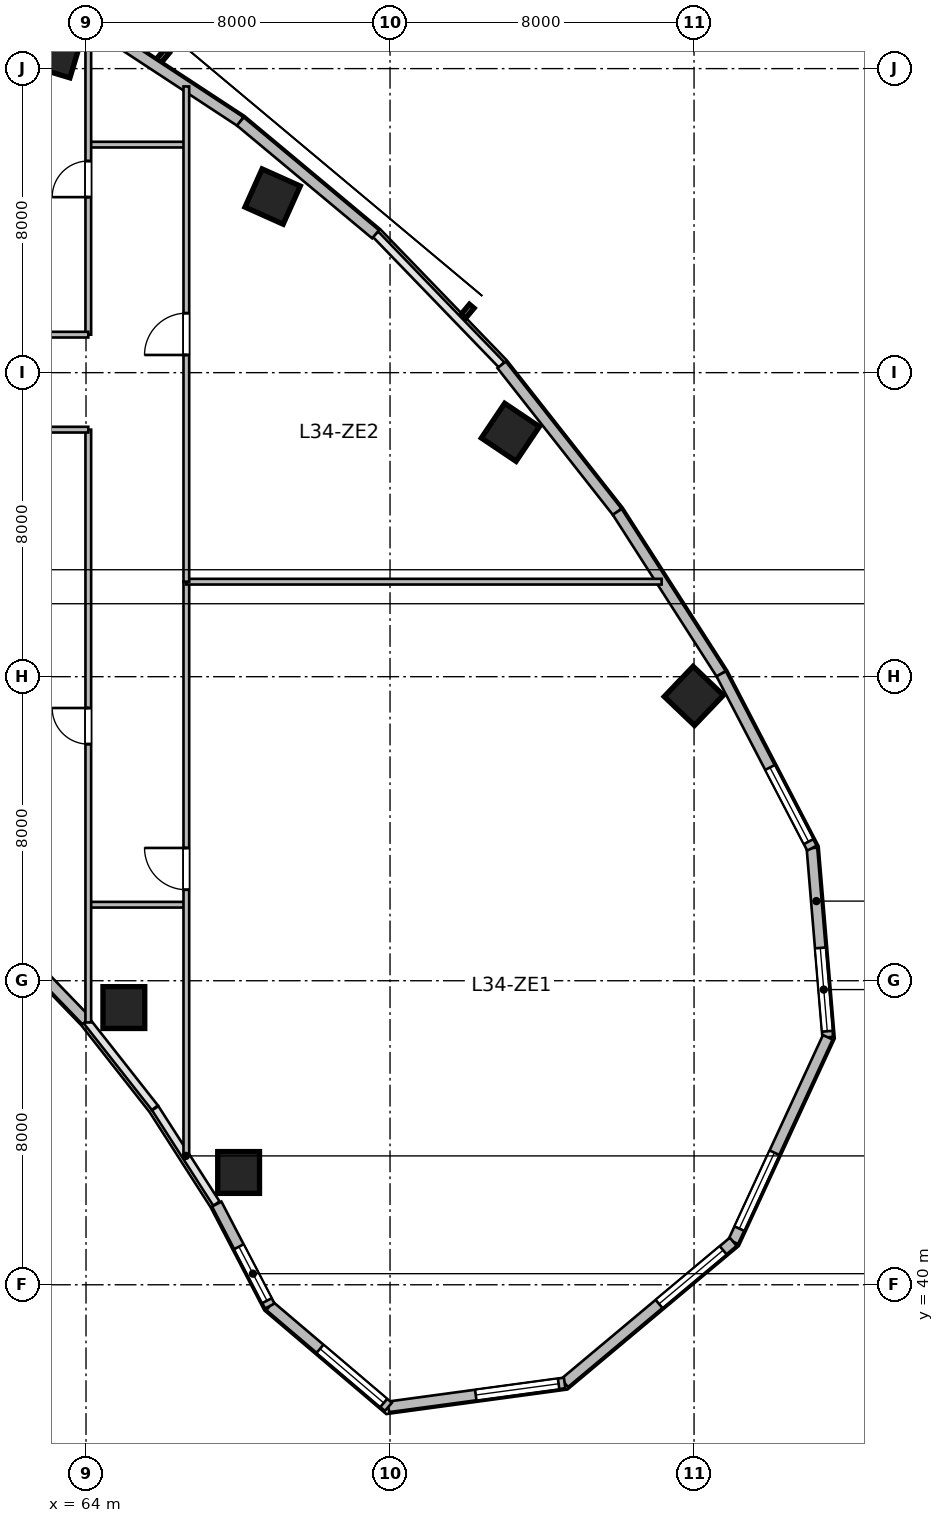
"""IFC4 building model, lengths in metres.
Left out: names, types, materials, properties, quantities, classifications, styles, units other than length and angle.
Written with IfcOpenShell. Run it as: python <this file> out.ifc"""

import sys

from ifc_helpers import new_model, si_unit, direction, frame, frame_2d, origin, origin_2d, place, context, subcontext, project, spatial, rectangle, circle, extrude, source, transform, mapped, element, fill, save


model = new_model("IFC4")
c1 = context("Model", 3, precision=1e-05, world=origin(), true_north=direction((0.0, 1.0)))
c2 = subcontext(c1, "Body", "Model", "MODEL_VIEW")
j1 = project(units=[si_unit("LENGTHUNIT", "METRE"), si_unit("PLANEANGLEUNIT", "RADIAN")], contexts=[c1])
p1 = place(None, origin())
s1 = spatial("IfcSite", under=j1, at=p1, CompositionType="ELEMENT")
p2 = place(p1, origin())
s2 = spatial("IfcBuilding", under=s1, at=p2, CompositionType="ELEMENT")
p3 = place(p2, frame((0.0, 0.0, 142.8)))
s3 = spatial("IfcBuildingStorey", under=s2, at=p3, CompositionType="ELEMENT", Elevation=142.8)
m1 = source(origin(), c2, "Body", "SweptSolid", [
    extrude(rectangle(XDim=1.1, YDim=1.1, at=origin_2d()), origin(), (0.0, 0.0, 1.0), 3.9),
])
for number, where, z_axis, x_axis in (
    (1, (63.209, 72.442, 0.0), (0.0, 0.0, 1.0), (0.289, 0.957, 0.0)),
    (2, (68.91, 68.633, 0.0), (0.0, 0.0, 1.0), (0.409, 0.912, 0.0)),
):
    element("IfcColumn", number, at=place(p3, frame(where, z_axis=z_axis, x_axis=x_axis)), inside=s3, PredefinedType="COLUMN", context=c2, shape_type="MappedRepresentation", body=[
        mapped(m1, transform((0.0, 0.0, 0.0), scale=1.0)),
    ])
m2 = source(origin(), c2, "Body", "SweptSolid", [
    extrude(circle(Radius=0.55, at=origin_2d()), origin(), (0.0, 0.0, 1.0), 3.9),
])
p4 = place(p3, frame((64.996, 47.294, 0.0), z_axis=(0.0, 0.0, 1.0), x_axis=(0.55774510898, 0.830012285095, 0.0)))
e3 = element("IfcColumn", 3, at=p4, inside=s3, PredefinedType="COLUMN", context=c2, shape_type="MappedRepresentation", body=[
    mapped(m2, transform((0.0, 0.0, 0.0), scale=1.0)),
])
p5 = place(p3, frame((75.167, 62.43, 0.0), z_axis=(0.0, 0.0, 1.0), x_axis=(0.55774510898, 0.830012285095, 0.0)))
e4 = element("IfcColumn", 4, at=p5, inside=s3, PredefinedType="COLUMN", context=c2, shape_type="MappedRepresentation", body=[
    mapped(m1, transform((0.0, 0.0, 0.0), scale=1.0)),
])
p6 = place(p3, frame((68.015, 42.955, 0.0), z_axis=(0.0, 0.0, 1.0), x_axis=(0.690756218984, 0.723087716626, 0.0)))
e5 = element("IfcColumn", 5, at=p6, inside=s3, PredefinedType="COLUMN", context=c2, shape_type="MappedRepresentation", body=[
    mapped(m2, transform((0.0, 0.0, 0.0), scale=1.0)),
])
p7 = place(p3, frame((79.993, 55.494, 0.0), z_axis=(0.0, 0.0, 1.0), x_axis=(0.690756218984, 0.723087716626, 0.0)))
e6 = element("IfcColumn", 6, at=p7, inside=s3, PredefinedType="COLUMN", context=c2, shape_type="MappedRepresentation", body=[
    mapped(m1, transform((0.0, 0.0, 0.0), scale=1.0)),
])
m3 = source(origin(), c2, "Body", "SweptSolid", [
    extrude(rectangle(XDim=4.994, YDim=0.28, at=frame_2d((2.497, 0.0))), origin(), (0.0, 0.0, 1.0), 3.65),
])
p8 = place(p3, frame((83.102, 51.489, 0.0), z_axis=(0.0, 0.0, 1.0), x_axis=(0.083344839916, -0.996520766296, 0.0)))
e7 = element("IfcWall", 7, at=p8, inside=s3, PredefinedType="SOLIDWALL", context=c2, shape_type="MappedRepresentation", body=[
    mapped(m3, transform((0.0, 0.0, 0.0), scale=1.0)),
])
p9 = place(p8, frame((2.635, 0.0, 0.95)))
e8 = element("IfcOpeningElement", 8, at=p9, cuts=e7, PredefinedType="OPENING", context=c2, shape_type="SweptSolid", body=[
    extrude(rectangle(XDim=2.2, YDim=2.1, at=frame_2d((1.1, 1.05))), frame((0.0, 0.15, 0.0), z_axis=(0.0, -1.0, 0.0), x_axis=(1.0, 0.0, 0.0)), (0.0, 0.0, 1.0), 0.3),
])
m4 = source(origin(), c2, "Body", "SweptSolid", [
    extrude(rectangle(XDim=5.927, YDim=0.28, at=frame_2d((2.964, 0.0))), origin(), (0.0, 0.0, 1.0), 3.65),
])
p10 = place(p3, frame((83.519, 46.512, 0.0), z_axis=(0.0, 0.0, 1.0), x_axis=(-0.419656204795, -0.907683132914, 0.0)))
e9 = element("IfcWall", 9, at=p10, inside=s3, PredefinedType="SOLIDWALL", context=c2, shape_type="MappedRepresentation", body=[
    mapped(m4, transform((0.0, 0.0, 0.0), scale=1.0)),
])
p11 = place(p10, frame((3.346, 0.0, 0.95)))
e10 = element("IfcOpeningElement", 10, at=p11, cuts=e9, PredefinedType="OPENING", context=c2, shape_type="SweptSolid", body=[
    extrude(rectangle(XDim=2.2, YDim=2.1, at=frame_2d((1.1, 1.05))), frame((0.0, 0.15, 0.0), z_axis=(0.0, -1.0, 0.0), x_axis=(1.0, 0.0, 0.0)), (0.0, 0.0, 1.0), 0.3),
])
m5 = source(origin(), c2, "Body", "SweptSolid", [
    extrude(rectangle(XDim=5.786, YDim=0.28, at=frame_2d((2.893, 0.0))), origin(), (0.0, 0.0, 1.0), 3.65),
])
p12 = place(p3, frame((81.031, 41.131, 0.0), z_axis=(0.0, 0.0, 1.0), x_axis=(-0.766711306852, -0.641992034176, 0.0)))
e11 = element("IfcWall", 11, at=p12, inside=s3, PredefinedType="SOLIDWALL", context=c2, shape_type="MappedRepresentation", body=[
    mapped(m5, transform((0.0, 0.0, 0.0), scale=1.0)),
])
p13 = place(p12, frame((0.347, 0.0, 0.95)))
e12 = element("IfcOpeningElement", 12, at=p13, cuts=e11, PredefinedType="OPENING", context=c2, shape_type="SweptSolid", body=[
    extrude(rectangle(XDim=2.2, YDim=2.1, at=frame_2d((1.1, 1.05))), frame((0.0, 0.15, 0.0), z_axis=(0.0, -1.0, 0.0), x_axis=(1.0, 0.0, 0.0)), (0.0, 0.0, 1.0), 0.3),
])
m6 = source(origin(), c2, "Body", "SweptSolid", [
    extrude(rectangle(XDim=4.68, YDim=0.28, at=frame_2d((2.34, 0.0))), origin(), (0.0, 0.0, 1.0), 3.65),
])
p14 = place(p3, frame((76.594, 37.417, 0.0), z_axis=(0.0, 0.0, 1.0), x_axis=(-0.990931146435, -0.134370618162, 0.0)))
e13 = element("IfcWall", 13, at=p14, inside=s3, PredefinedType="SOLIDWALL", context=c2, shape_type="MappedRepresentation", body=[
    mapped(m6, transform((0.0, 0.0, 0.0), scale=1.0)),
])
p15 = place(p14, frame((0.16, 0.0, 0.95)))
e14 = element("IfcOpeningElement", 14, at=p15, cuts=e13, PredefinedType="OPENING", context=c2, shape_type="SweptSolid", body=[
    extrude(rectangle(XDim=2.2, YDim=2.1, at=frame_2d((1.1, 1.05))), frame((0.0, 0.15, 0.0), z_axis=(0.0, -1.0, 0.0), x_axis=(1.0, 0.0, 0.0)), (0.0, 0.0, 1.0), 0.3),
])
m7 = source(origin(), c2, "Body", "SweptSolid", [
    extrude(rectangle(XDim=4.096, YDim=0.28, at=frame_2d((2.048, 0.0))), origin(), (0.0, 0.0, 1.0), 3.65),
])
p16 = place(p3, frame((71.957, 36.788, 0.0), z_axis=(0.0, 0.0, 1.0), x_axis=(-0.761926081737, 0.647663991564, 0.0)))
e15 = element("IfcWall", 15, at=p16, inside=s3, PredefinedType="SOLIDWALL", context=c2, shape_type="MappedRepresentation", body=[
    mapped(m7, transform((0.0, 0.0, 0.0), scale=1.0)),
])
p17 = place(p16, frame((0.16, 0.0, 0.95)))
e16 = element("IfcOpeningElement", 16, at=p17, cuts=e15, PredefinedType="OPENING", context=c2, shape_type="SweptSolid", body=[
    extrude(rectangle(XDim=2.2, YDim=2.1, at=frame_2d((1.1, 1.05))), frame((0.0, 0.15, 0.0), z_axis=(0.0, -1.0, 0.0), x_axis=(1.0, 0.0, 0.0)), (0.0, 0.0, 1.0), 0.3),
])
m8 = source(origin(), c2, "Body", "SweptSolid", [
    extrude(rectangle(XDim=3.024, YDim=0.28, at=frame_2d((1.512, 0.0))), origin(), (0.0, 0.0, 1.0), 3.65),
])
p18 = place(p3, frame((68.836, 39.44, 0.0), z_axis=(0.0, 0.0, 1.0), x_axis=(-0.461718746531, 0.887026380161, 0.0)))
e17 = element("IfcWall", 17, at=p18, inside=s3, PredefinedType="SOLIDWALL", context=c2, shape_type="MappedRepresentation", body=[
    mapped(m8, transform((0.0, 0.0, 0.0), scale=1.0)),
])
p19 = place(p18, frame((0.16, 0.0, 0.95)))
e18 = element("IfcOpeningElement", 18, at=p19, cuts=e17, PredefinedType="OPENING", context=c2, shape_type="SweptSolid", body=[
    extrude(rectangle(XDim=1.6, YDim=1.9, at=frame_2d((0.8, 0.95))), frame((0.0, 0.15, 0.0), z_axis=(0.0, -1.0, 0.0), x_axis=(1.0, 0.0, 0.0)), (0.0, 0.0, 1.0), 0.3),
])
m9 = source(origin(), c2, "Body", "SweptSolid", [
    extrude(rectangle(XDim=2.812, YDim=0.28, at=frame_2d((1.406, 0.0))), origin(), (0.0, 0.0, 1.0), 3.65),
])
p20 = place(p3, frame((64.008, 46.95, 0.0), z_axis=(0.0, 0.0, 1.0), x_axis=(-0.694583668785, 0.719411931411, 0.0)))
e19 = element("IfcWall", 19, at=p20, inside=s3, PredefinedType="SOLIDWALL", context=c2, shape_type="MappedRepresentation", body=[
    mapped(m9, transform((0.0, 0.0, 0.0), scale=1.0)),
])
m10 = source(origin(), c2, "Body", "SweptSolid", [
    extrude(rectangle(XDim=4.501, YDim=0.28, at=frame_2d((2.25, 0.0))), origin(), (0.0, 0.0, 1.0), 3.65),
])
p21 = place(p3, frame((64.298, 73.08, 0.0), z_axis=(0.0, 0.0, 1.0), x_axis=(0.835984920737, -0.548752414391, 0.0)))
e20 = element("IfcWall", 20, at=p21, inside=s3, PredefinedType="SOLIDWALL", context=c2, shape_type="MappedRepresentation", body=[
    mapped(m10, transform((0.0, 0.0, 0.0), scale=1.0)),
])
m11 = source(origin(), c2, "Body", "SweptSolid", [
    extrude(rectangle(XDim=4.634, YDim=0.28, at=frame_2d((2.317, 0.0))), origin(), (0.0, 0.0, 1.0), 3.65),
])
p22 = place(p3, frame((68.061, 70.61, 0.0), z_axis=(0.0, 0.0, 1.0), x_axis=(0.767910229096, -0.640557475993, 0.0)))
e21 = element("IfcWall", 21, at=p22, inside=s3, PredefinedType="SOLIDWALL", context=c2, shape_type="MappedRepresentation", body=[
    mapped(m11, transform((0.0, 0.0, 0.0), scale=1.0)),
])
m12 = source(origin(), c2, "Body", "SweptSolid", [
    extrude(rectangle(XDim=4.922, YDim=0.28, at=frame_2d((2.461, 0.0))), origin(), (0.0, 0.0, 1.0), 3.65),
])
p23 = place(p3, frame((74.936, 64.206, 0.0), z_axis=(0.0, 0.0, 1.0), x_axis=(0.61817639101, -0.786039407153, 0.0)))
e22 = element("IfcWall", 22, at=p23, inside=s3, PredefinedType="SOLIDWALL", context=c2, shape_type="MappedRepresentation", body=[
    mapped(m12, transform((0.0, 0.0, 0.0), scale=1.0)),
])
m13 = source(origin(), c2, "Body", "SweptSolid", [
    extrude(rectangle(XDim=5.065, YDim=0.28, at=frame_2d((2.532, 0.0))), origin(), (0.0, 0.0, 1.0), 3.65),
])
p24 = place(p3, frame((77.979, 60.338, 0.0), z_axis=(0.0, 0.0, 1.0), x_axis=(0.540177618806, -0.841551032404, 0.0)))
e23 = element("IfcWall", 23, at=p24, inside=s3, PredefinedType="SOLIDWALL", context=c2, shape_type="MappedRepresentation", body=[
    mapped(m13, transform((0.0, 0.0, 0.0), scale=1.0)),
])
m14 = source(origin(), c2, "Body", "SweptSolid", [
    extrude(rectangle(XDim=5.171, YDim=0.28, at=frame_2d((2.585, 0.0))), origin(), (0.0, 0.0, 1.0), 3.65),
])
p25 = place(p3, frame((80.715, 56.075, 0.0), z_axis=(0.0, 0.0, 1.0), x_axis=(0.461752581363, -0.887008767491, 0.0)))
e24 = element("IfcWall", 24, at=p25, inside=s3, PredefinedType="SOLIDWALL", context=c2, shape_type="MappedRepresentation", body=[
    mapped(m14, transform((0.0, 0.0, 0.0), scale=1.0)),
])
p26 = place(p25, frame((2.778, 0.0, 0.95)))
e25 = element("IfcOpeningElement", 25, at=p26, cuts=e24, PredefinedType="OPENING", context=c2, shape_type="SweptSolid", body=[
    extrude(rectangle(XDim=2.2, YDim=2.1, at=frame_2d((1.1, 1.05))), frame((0.0, 0.15, 0.0), z_axis=(0.0, -1.0, 0.0), x_axis=(1.0, 0.0, 0.0)), (0.0, 0.0, 1.0), 0.3),
])
m15 = source(origin(), c2, "Body", "SweptSolid", [
    extrude(rectangle(XDim=2.5, YDim=0.15, at=frame_2d((1.25, 0.0))), origin(), (0.0, 0.0, 1.0), 3.65),
])
for number, where, z_axis, x_axis in (
    (26, (64.1, 50.0, 0.0), (0.0, 0.0, 1.0), (1.0, 0.0, 0.0)),
    (27, (64.1, 70.0, 0.0), (0.0, 0.0, 1.0), (1.0, 0.0, 0.0)),
):
    element("IfcWall", number, at=place(p3, frame(where, z_axis=z_axis, x_axis=x_axis)), inside=s3, PredefinedType="PARTITIONING", context=c2, shape_type="MappedRepresentation", body=[
        mapped(m15, transform((0.0, 0.0, 0.0), scale=1.0)),
    ])
m16 = source(origin(), c2, "Body", "SweptSolid", [
    extrude(rectangle(XDim=15.112, YDim=0.15, at=frame_2d((7.556, 0.0))), origin(), (0.0, 0.0, 1.0), 2.942),
])
p27 = place(p3, frame((66.64, 43.388, 0.0), z_axis=(0.0, 0.0, 1.0), x_axis=(0.0, 1.0, 0.0)))
e28 = element("IfcWall", 28, at=p27, inside=s3, PredefinedType="PARTITIONING", context=c2, shape_type="MappedRepresentation", body=[
    mapped(m16, transform((0.0, 0.0, 0.0), scale=1.0)),
])
p28 = place(p27, frame((7.006, 0.0, 0.0)))
e29 = element("IfcOpeningElement", 29, at=p28, cuts=e28, PredefinedType="OPENING", context=c2, shape_type="SweptSolid", body=[
    extrude(rectangle(XDim=1.1, YDim=2.15, at=frame_2d((0.55, 1.075))), frame((0.0, 0.085, 0.0), z_axis=(0.0, -1.0, 0.0), x_axis=(1.0, 0.0, 0.0)), (0.0, 0.0, 1.0), 0.17),
])
m17 = source(origin(), c2, "Body", "SweptSolid", [
    extrude(rectangle(XDim=12.507, YDim=0.15, at=frame_2d((6.253, 0.0))), origin(), (0.0, 0.0, 1.0), 3.65),
])
p29 = place(p3, frame((66.64, 58.5, 0.0), z_axis=(0.0, 0.0, 1.0), x_axis=(1.0, 0.0, 0.0)))
e30 = element("IfcWall", 30, at=p29, inside=s3, PredefinedType="PARTITIONING", context=c2, shape_type="MappedRepresentation", body=[
    mapped(m17, transform((0.0, 0.0, 0.0), scale=1.0)),
])
m18 = source(origin(), c2, "Body", "SweptSolid", [
    extrude(rectangle(XDim=13.031, YDim=0.15, at=frame_2d((6.515, 0.0))), origin(), (0.0, 0.0, 1.0), 2.942),
])
p30 = place(p3, frame((66.64, 58.5, 0.0), z_axis=(0.0, 0.0, 1.0), x_axis=(0.0, 1.0, 0.0)))
e31 = element("IfcWall", 31, at=p30, inside=s3, PredefinedType="PARTITIONING", context=c2, shape_type="MappedRepresentation", body=[
    mapped(m18, transform((0.0, 0.0, 0.0), scale=1.0)),
])
p31 = place(p30, frame((5.965, 0.0, 0.0)))
e32 = element("IfcOpeningElement", 32, at=p31, cuts=e31, PredefinedType="OPENING", context=c2, shape_type="SweptSolid", body=[
    extrude(rectangle(XDim=1.1, YDim=2.15, at=frame_2d((0.55, 1.075))), frame((0.0, 0.085, 0.0), z_axis=(0.0, -1.0, 0.0), x_axis=(1.0, 0.0, 0.0)), (0.0, 0.0, 1.0), 0.17),
])
m19 = source(origin(), c2, "Body", "SweptSolid", [
    extrude(rectangle(XDim=15.598, YDim=0.15, at=frame_2d((7.799, 0.0))), origin(), (0.0, 0.0, 1.0), 2.942),
])
p32 = place(p3, frame((64.06, 46.902, 0.0), z_axis=(0.0, 0.0, 1.0), x_axis=(0.0, 1.0, 0.0)))
e33 = element("IfcWall", 33, at=p32, inside=s3, PredefinedType="PARTITIONING", context=c2, shape_type="MappedRepresentation", body=[
    mapped(m19, transform((0.0, 0.0, 0.0), scale=1.0)),
])
p33 = place(p32, frame((7.324, 0.0, 0.0)))
e34 = element("IfcOpeningElement", 34, at=p33, cuts=e33, PredefinedType="OPENING", context=c2, shape_type="SweptSolid", body=[
    extrude(rectangle(XDim=0.95, YDim=2.1, at=frame_2d((0.475, 1.05))), frame((0.0, 0.085, 0.0), z_axis=(0.0, -1.0, 0.0), x_axis=(1.0, 0.0, 0.0)), (0.0, 0.0, 1.0), 0.17),
])
m20 = source(origin(), c2, "Body", "SweptSolid", [
    extrude(rectangle(XDim=4.56, YDim=0.15, at=frame_2d((2.28, 0.0))), origin(), (0.0, 0.0, 1.0), 3.65),
])
p34 = place(p3, frame((59.5, 62.5, 0.0), z_axis=(0.0, 0.0, 1.0), x_axis=(1.0, 0.0, 0.0)))
e35 = element("IfcWall", 35, at=p34, inside=s3, PredefinedType="PARTITIONING", context=c2, shape_type="MappedRepresentation", body=[
    mapped(m20, transform((0.0, 0.0, 0.0), scale=1.0)),
])
m21 = source(origin(), c2, "Body", "SweptSolid", [
    extrude(rectangle(XDim=8.187, YDim=0.15, at=frame_2d((4.093, 0.0))), origin(), (0.0, 0.0, 1.0), 3.65),
])
p35 = place(p3, frame((64.06, 65.0, 0.0), z_axis=(0.0, 0.0, 1.0), x_axis=(0.0, 1.0, 0.0)))
e36 = element("IfcWall", 36, at=p35, inside=s3, PredefinedType="PARTITIONING", context=c2, shape_type="MappedRepresentation", body=[
    mapped(m21, transform((0.0, 0.0, 0.0), scale=1.0)),
])
p36 = place(p35, frame((3.618, 0.0, 0.0)))
e37 = element("IfcOpeningElement", 37, at=p36, cuts=e36, PredefinedType="OPENING", context=c2, shape_type="SweptSolid", body=[
    extrude(rectangle(XDim=0.95, YDim=2.1, at=frame_2d((0.475, 1.05))), frame((0.0, 0.085, 0.0), z_axis=(0.0, -1.0, 0.0), x_axis=(1.0, 0.0, 0.0)), (0.0, 0.0, 1.0), 0.17),
])
m22 = source(origin(), c2, "Body", "SweptSolid", [
    extrude(rectangle(XDim=2.46, YDim=0.15, at=frame_2d((1.23, 0.0))), origin(), (0.0, 0.0, 1.0), 3.65),
])
p37 = place(p3, frame((61.6, 65.0, 0.0), z_axis=(0.0, 0.0, 1.0), x_axis=(1.0, 0.0, 0.0)))
e38 = element("IfcWall", 38, at=p37, inside=s3, PredefinedType="PARTITIONING", context=c2, shape_type="MappedRepresentation", body=[
    mapped(m22, transform((0.0, 0.0, 0.0), scale=1.0)),
])
m23 = source(origin(), c2, "Body", "SweptSolid", [
    extrude(rectangle(XDim=2.2, YDim=2.1, at=frame_2d((1.1, 1.05))), frame((0.0, 0.03, 0.0), z_axis=(0.0, -1.0, 0.0), x_axis=(1.0, 0.0, 0.0)), (0.0, 0.0, 1.0), 0.06),
])
p38 = place(p9, origin())
e39 = element("IfcWindow", 39, at=p38, inside=s3, PartitioningType="TRIPLE_PANEL_VERTICAL", PredefinedType="WINDOW", context=c2, shape_type="MappedRepresentation", body=[
    mapped(m23, transform((0.0, 0.0, 0.0), scale=1.0)),
])
fill(e8, e39)
p39 = place(p11, origin())
e40 = element("IfcWindow", 40, at=p39, inside=s3, PartitioningType="TRIPLE_PANEL_VERTICAL", PredefinedType="WINDOW", context=c2, shape_type="MappedRepresentation", body=[
    mapped(m23, transform((0.0, 0.0, 0.0), scale=1.0)),
])
fill(e10, e40)
p40 = place(p13, origin())
e41 = element("IfcWindow", 41, at=p40, inside=s3, PartitioningType="TRIPLE_PANEL_VERTICAL", PredefinedType="WINDOW", context=c2, shape_type="MappedRepresentation", body=[
    mapped(m23, transform((0.0, 0.0, 0.0), scale=1.0)),
])
fill(e12, e41)
p41 = place(p15, origin())
e42 = element("IfcWindow", 42, at=p41, inside=s3, PartitioningType="TRIPLE_PANEL_VERTICAL", PredefinedType="WINDOW", context=c2, shape_type="MappedRepresentation", body=[
    mapped(m23, transform((0.0, 0.0, 0.0), scale=1.0)),
])
fill(e14, e42)
p42 = place(p17, origin())
e43 = element("IfcWindow", 43, at=p42, inside=s3, PartitioningType="TRIPLE_PANEL_VERTICAL", PredefinedType="WINDOW", context=c2, shape_type="MappedRepresentation", body=[
    mapped(m23, transform((0.0, 0.0, 0.0), scale=1.0)),
])
fill(e16, e43)
m24 = source(origin(), c2, "Body", "SweptSolid", [
    extrude(rectangle(XDim=1.6, YDim=1.9, at=frame_2d((0.8, 0.95))), frame((0.0, 0.03, 0.0), z_axis=(0.0, -1.0, 0.0), x_axis=(1.0, 0.0, 0.0)), (0.0, 0.0, 1.0), 0.06),
])
p43 = place(p19, origin())
e44 = element("IfcWindow", 44, at=p43, inside=s3, PartitioningType="SINGLE_PANEL", PredefinedType="WINDOW", context=c2, shape_type="MappedRepresentation", body=[
    mapped(m24, transform((0.0, 0.0, 0.0), scale=1.0)),
])
fill(e18, e44)
p44 = place(p26, origin())
e45 = element("IfcWindow", 45, at=p44, inside=s3, PartitioningType="TRIPLE_PANEL_VERTICAL", PredefinedType="WINDOW", context=c2, shape_type="MappedRepresentation", body=[
    mapped(m23, transform((0.0, 0.0, 0.0), scale=1.0)),
])
fill(e25, e45)
m25 = source(origin(), c2, "Body", "SweptSolid", [
    extrude(rectangle(XDim=1.1, YDim=2.15, at=frame_2d((0.55, 1.075))), frame((0.0, 0.025, 0.0), z_axis=(0.0, -1.0, 0.0), x_axis=(1.0, 0.0, 0.0)), (0.0, 0.0, 1.0), 0.05),
])
p45 = place(p28, origin())
e46 = element("IfcDoor", 46, at=p45, inside=s3, OperationType="SINGLE_SWING_RIGHT", PredefinedType="DOOR", context=c2, shape_type="MappedRepresentation", body=[
    mapped(m25, transform((0.0, 0.0, 0.0), scale=1.0)),
])
fill(e29, e46)
p46 = place(p31, origin())
e47 = element("IfcDoor", 47, at=p46, inside=s3, OperationType="SINGLE_SWING_LEFT", PredefinedType="DOOR", context=c2, shape_type="MappedRepresentation", body=[
    mapped(m25, transform((0.0, 0.0, 0.0), scale=1.0)),
])
fill(e32, e47)
m26 = source(origin(), c2, "Body", "SweptSolid", [
    extrude(rectangle(XDim=0.95, YDim=2.1, at=frame_2d((0.475, 1.05))), frame((0.0, 0.025, 0.0), z_axis=(0.0, -1.0, 0.0), x_axis=(1.0, 0.0, 0.0)), (0.0, 0.0, 1.0), 0.05),
])
p47 = place(p33, origin())
e48 = element("IfcDoor", 48, at=p47, inside=s3, OperationType="SINGLE_SWING_RIGHT", PredefinedType="DOOR", context=c2, shape_type="MappedRepresentation", body=[
    mapped(m26, transform((0.0, 0.0, 0.0), scale=1.0)),
])
fill(e34, e48)
p48 = place(p36, origin())
e49 = element("IfcDoor", 49, at=p48, inside=s3, OperationType="SINGLE_SWING_LEFT", PredefinedType="DOOR", context=c2, shape_type="MappedRepresentation", body=[
    mapped(m26, transform((0.0, 0.0, 0.0), scale=1.0)),
])
fill(e37, e49)
save(model, sys.argv[1])
